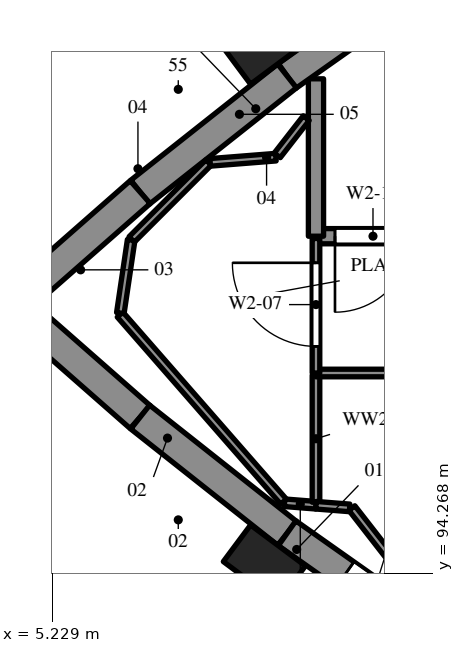
"""IFC4 building model, lengths in metres.
Left out: names, types, materials, properties, quantities, classifications, styles, units other than length and angle.
Written with IfcOpenShell. Run it as: python <this file> out.ifc"""

import sys

from ifc_helpers import new_model, si_unit, direction, frame, frame_2d, origin, origin_2d, place, context, subcontext, project, spatial, polyline, rectangle, outline, extrude, element, fill, save


model = new_model("IFC4")
c1 = context("Model", 3, precision=1e-05, world=origin(), true_north=direction((0.0, 1.0)))
c2 = subcontext(c1, "Body", "Model", "MODEL_VIEW")
j1 = project(units=[si_unit("LENGTHUNIT", "METRE"), si_unit("PLANEANGLEUNIT", "RADIAN")], contexts=[c1])
p1 = place(None, origin())
s1 = spatial("IfcSite", under=j1, at=p1, CompositionType="ELEMENT")
p2 = place(p1, origin())
s2 = spatial("IfcBuilding", under=s1, at=p2, CompositionType="ELEMENT")
p3 = place(p2, frame((0.0, 0.0, 10.2)))
s3 = spatial("IfcBuildingStorey", under=s2, at=p3, CompositionType="ELEMENT", Elevation=10.2)
p4 = place(p3, frame((16.9, 98.7, 0.0), z_axis=(0.0, 0.0, 1.0), x_axis=(-1.0, 0.0, 0.0)))
e1 = element("IfcWall", 1, at=p4, inside=s3, PredefinedType="SHEAR", context=c2, shape_type="SweptSolid", body=[
    extrude(outline(polyline([(0.0, 0.0), (8.2, 0.0), (8.2, 5.845), (8.187, 5.849), (8.088, 5.881), (7.972, 5.899), (7.896, 5.911), (7.819, 5.891), (0.0, 8.908), (0.0, 0.0)])), frame((0.0, 0.1, 0.0), z_axis=(0.0, -1.0, 0.0), x_axis=(1.0, 0.0, 0.0)), (0.0, 0.0, 1.0), 0.2),
])
p5 = place(p4, frame((6.95, 0.0, 0.0)))
e2 = element("IfcOpeningElement", 2, at=p5, cuts=e1, PredefinedType="OPENING", context=c2, shape_type="SweptSolid", body=[
    extrude(rectangle(XDim=1.0, YDim=2.4, at=frame_2d((0.5, 1.2))), frame((0.0, 0.11, 0.0), z_axis=(0.0, -1.0, 0.0), x_axis=(1.0, 0.0, 0.0)), (0.0, 0.0, 1.0), 0.22),
])
p6 = place(p3, frame((8.7, 98.7, 0.0), z_axis=(0.0, 0.0, 1.0), x_axis=(0.0, 1.0, 0.0)))
e3 = element("IfcWall", 3, at=p6, inside=s3, PredefinedType="SHEAR", context=c2, shape_type="SweptSolid", body=[
    extrude(outline(polyline([(0.0, 0.0), (2.071, 0.0), (2.071, 4.028), (0.077, 5.842), (0.0, 5.912), (0.0, 0.0)])), frame((0.0, 0.1, 0.0), z_axis=(0.0, -1.0, 0.0), x_axis=(1.0, 0.0, 0.0)), (0.0, 0.0, 1.0), 0.2),
])
p7 = place(p3, frame((4.703, 97.8, 0.0), z_axis=(0.0, 0.0, 1.0), x_axis=(0.751212351098, -0.660060605973, 0.0)))
e4 = element("IfcWall", 4, at=p7, inside=s3, PredefinedType="SOLIDWALL", context=c2, shape_type="SweptSolid", body=[
    extrude(outline(polyline([(0.0, 0.0), (2.242, 0.0), (2.242, 2.647), (2.202, 2.635), (0.372, 1.901), (0.145, 1.809), (0.083, 1.784), (0.0, 1.751), (0.0, 0.0)])), frame((0.0, 0.2, 0.0), z_axis=(0.0, -1.0, 0.0), x_axis=(1.0, 0.0, 0.0)), (0.0, 0.0, 1.0), 0.4),
])
p8 = place(p3, frame((6.387, 96.32, 0.0), z_axis=(0.0, 0.0, 1.0), x_axis=(0.784278812541, -0.620408530082, 0.0)))
e5 = element("IfcWall", 5, at=p8, inside=s3, PredefinedType="SOLIDWALL", context=c2, shape_type="SweptSolid", body=[
    extrude(outline(polyline([(0.0, 0.0), (2.464, 0.0), (2.464, 3.551), (2.446, 3.544), (2.288, 3.486), (2.129, 3.428), (0.051, 2.669), (0.0, 2.651), (0.0, 0.0)])), frame((0.0, 0.2, 0.0), z_axis=(0.0, -1.0, 0.0), x_axis=(1.0, 0.0, 0.0)), (0.0, 0.0, 1.0), 0.4),
])
p9 = place(p3, frame((8.32, 94.792, 0.0), z_axis=(0.0, 0.0, 1.0), x_axis=(0.817028877428, -0.576596751161, 0.0)))
e6 = element("IfcWall", 6, at=p9, inside=s3, PredefinedType="SOLIDWALL", context=c2, shape_type="SweptSolid", body=[
    extrude(outline(polyline([(0.0, 0.0), (2.772, 0.0), (2.772, 2.848), (2.406, 2.968), (0.311, 3.647), (0.169, 3.693), (0.0, 3.555), (0.0, 0.0)])), frame((0.0, 0.2, 0.0), z_axis=(0.0, -1.0, 0.0), x_axis=(1.0, 0.0, 0.0)), (0.0, 0.0, 1.0), 0.4),
])
p10 = place(p9, frame((0.936, 0.0, 1.6)))
e7 = element("IfcOpeningElement", 7, at=p10, cuts=e6, PredefinedType="OPENING", context=c2, shape_type="SweptSolid", body=[
    extrude(rectangle(XDim=0.9, YDim=0.6, at=frame_2d((0.45, 0.3))), frame((0.0, 0.21, 0.0), z_axis=(0.0, -1.0, 0.0), x_axis=(1.0, 0.0, 0.0)), (0.0, 0.0, 1.0), 0.42),
])
p11 = place(p3, frame((10.585, 102.407, 0.0), z_axis=(0.0, 0.0, 1.0), x_axis=(-0.817070367038, -0.57653795652, 0.0)))
e8 = element("IfcWall", 8, at=p11, inside=s3, PredefinedType="SOLIDWALL", context=c2, shape_type="SweptSolid", body=[
    extrude(outline(polyline([(0.0, 0.0), (2.772, 0.0), (2.772, 3.555), (2.744, 3.568), (2.603, 3.693), (2.462, 3.647), (0.367, 2.968), (0.0, 2.848), (0.0, 0.0)])), frame((0.0, 0.2, 0.0), z_axis=(0.0, -1.0, 0.0), x_axis=(1.0, 0.0, 0.0)), (0.0, 0.0, 1.0), 0.4),
])
p12 = place(p3, frame((8.32, 100.809, 0.0), z_axis=(0.0, 0.0, 1.0), x_axis=(-0.784278812541, -0.620408530082, 0.0)))
e9 = element("IfcWall", 9, at=p12, inside=s3, PredefinedType="SOLIDWALL", context=c2, shape_type="SweptSolid", body=[
    extrude(outline(polyline([(0.0, 0.0), (2.464, 0.0), (2.464, 2.651), (2.414, 2.669), (0.335, 3.428), (0.177, 3.486), (0.0, 3.551), (0.0, 0.0)])), frame((0.0, 0.2, 0.0), z_axis=(0.0, -1.0, 0.0), x_axis=(1.0, 0.0, 0.0)), (0.0, 0.0, 1.0), 0.4),
])
p13 = place(p3, frame((6.387, 99.28, 0.0), z_axis=(0.0, 0.0, 1.0), x_axis=(-0.751212351098, -0.660060605973, 0.0)))
e10 = element("IfcWall", 10, at=p13, inside=s3, PredefinedType="SOLIDWALL", context=c2, shape_type="SweptSolid", body=[
    extrude(outline(polyline([(0.0, 0.0), (2.242, 0.0), (2.242, 1.751), (2.159, 1.784), (2.097, 1.809), (1.869, 1.901), (0.0, 2.647), (0.0, 0.0)])), frame((0.0, 0.2, 0.0), z_axis=(0.0, -1.0, 0.0), x_axis=(1.0, 0.0, 0.0)), (0.0, 0.0, 1.0), 0.4),
])
for number, where, z_axis, x_axis in (
    (11, (8.021, 94.391, 0.0), (0.0, 0.0, 1.0), (0.802, -0.597, 0.0)),
    (12, (8.021, 101.209, 0.0), (0.0, 0.0, 1.0), (-0.802, -0.597, 0.0)),
):
    element("IfcColumn", number, at=place(p3, frame(where, z_axis=z_axis, x_axis=x_axis)), inside=s3, PredefinedType="PILASTER", context=c2, shape_type="SweptSolid", body=[
        extrude(rectangle(XDim=0.9, YDim=0.6, at=origin_2d()), origin(), (0.0, 0.0, 1.0), 2.507),
    ])
p14 = place(p3, frame((8.7, 95.16, 0.0), z_axis=(0.0, 0.0, 1.0), x_axis=(-0.996882323864, 0.078902676549, 0.0)))
e13 = element("IfcWall", 13, at=p14, inside=s3, PredefinedType="PARTITIONING", context=c2, shape_type="SweptSolid", body=[
    extrude(rectangle(XDim=0.415, YDim=0.1, at=frame_2d((0.207, 0.0))), origin(), (0.0, 0.0, 1.0), 2.5),
])
p15 = place(p3, frame((8.274, 95.208, 0.0), z_axis=(0.0, 0.0, 1.0), x_axis=(-0.658002077141, 0.753016113027, 0.0)))
e14 = element("IfcWall", 14, at=p15, inside=s3, PredefinedType="PARTITIONING", context=c2, shape_type="SweptSolid", body=[
    extrude(rectangle(XDim=3.268, YDim=0.1, at=frame_2d((1.634, 0.0))), origin(), (0.0, 0.0, 1.0), 2.5),
])
p16 = place(p3, frame((6.126, 97.689, 0.0), z_axis=(0.0, 0.0, 1.0), x_axis=(0.146448518259, 0.989218293148, 0.0)))
e15 = element("IfcWall", 15, at=p16, inside=s3, PredefinedType="PARTITIONING", context=c2, shape_type="SweptSolid", body=[
    extrude(rectangle(XDim=0.972, YDim=0.1, at=frame_2d((0.486, 0.0))), origin(), (0.0, 0.0, 1.0), 2.5),
])
p17 = place(p3, frame((6.275, 98.657, 0.0), z_axis=(0.0, 0.0, 1.0), x_axis=(0.707106781187, 0.707106781187, 0.0)))
e16 = element("IfcWall", 16, at=p17, inside=s3, PredefinedType="PARTITIONING", context=c2, shape_type="SweptSolid", body=[
    extrude(rectangle(XDim=1.432, YDim=0.1, at=frame_2d((0.716, 0.0))), origin(), (0.0, 0.0, 1.0), 2.5),
])
p18 = place(p3, frame((7.308, 99.671, 0.0), z_axis=(0.0, 0.0, 1.0), x_axis=(0.996862570919, 0.07915184584, 0.0)))
e17 = element("IfcWall", 17, at=p18, inside=s3, PredefinedType="PARTITIONING", context=c2, shape_type="SweptSolid", body=[
    extrude(rectangle(XDim=0.867, YDim=0.1, at=frame_2d((0.433, 0.0))), origin(), (0.0, 0.0, 1.0), 2.5),
])
p19 = place(p3, frame((8.191, 99.764, 0.0), z_axis=(0.0, 0.0, 1.0), x_axis=(0.61432197666, 0.789055453686, 0.0)))
e18 = element("IfcWall", 18, at=p19, inside=s3, PredefinedType="PARTITIONING", context=c2, shape_type="SweptSolid", body=[
    extrude(rectangle(XDim=0.62, YDim=0.1, at=frame_2d((0.31, 0.0))), origin(), (0.0, 0.0, 1.0), 2.5),
])
p20 = place(p3, frame((8.7, 95.2, 0.0), z_axis=(0.0, 0.0, 1.0), x_axis=(0.0, 1.0, 0.0)))
e19 = element("IfcWall", 19, at=p20, inside=s3, PredefinedType="PARTITIONING", context=c2, shape_type="SweptSolid", body=[
    extrude(rectangle(XDim=1.67, YDim=0.1, at=frame_2d((0.835, 0.0))), origin(), (0.0, 0.0, 1.0), 2.5),
])
p21 = place(p3, frame((10.255, 93.732, 0.0), z_axis=(0.0, 0.0, 1.0), x_axis=(-0.614371992728, 0.78901651095, 0.0)))
e20 = element("IfcWall", 20, at=p21, inside=s3, PredefinedType="PARTITIONING", context=c2, shape_type="SweptSolid", body=[
    extrude(rectangle(XDim=1.763, YDim=0.1, at=frame_2d((0.881, 0.0))), origin(), (0.0, 0.0, 1.0), 2.5),
])
p22 = place(p3, frame((9.142, 95.125, 0.0), z_axis=(0.0, 0.0, 1.0), x_axis=(-0.996900420086, 0.078673708649, 0.0)))
e21 = element("IfcWall", 21, at=p22, inside=s3, PredefinedType="PARTITIONING", context=c2, shape_type="SweptSolid", body=[
    extrude(rectangle(XDim=0.444, YDim=0.1, at=frame_2d((0.222, 0.0))), origin(), (0.0, 0.0, 1.0), 2.5),
])
p23 = place(p3, frame((11.433, 96.9, 0.0), z_axis=(0.0, 0.0, 1.0), x_axis=(-1.0, 0.0, 0.0)))
e22 = element("IfcWall", 22, at=p23, inside=s3, PredefinedType="PARTITIONING", context=c2, shape_type="SweptSolid", body=[
    extrude(rectangle(XDim=2.733, YDim=0.1, at=frame_2d((1.367, 0.0))), origin(), (0.0, 0.0, 1.0), 2.5),
])
p24 = place(p23, frame((0.917, 0.0, 0.0)))
e23 = element("IfcOpeningElement", 23, at=p24, cuts=e22, PredefinedType="OPENING", context=c2, shape_type="SweptSolid", body=[
    extrude(rectangle(XDim=0.9, YDim=2.1, at=frame_2d((0.45, 1.05))), frame((0.0, 0.06, 0.0), z_axis=(0.0, -1.0, 0.0), x_axis=(1.0, 0.0, 0.0)), (0.0, 0.0, 1.0), 0.12),
])
p25 = place(p3, frame((8.7, 96.9, 0.0), z_axis=(0.0, 0.0, 1.0), x_axis=(0.0, 1.0, 0.0)))
e24 = element("IfcWall", 24, at=p25, inside=s3, PredefinedType="PARTITIONING", context=c2, shape_type="SweptSolid", body=[
    extrude(rectangle(XDim=1.77, YDim=0.1, at=frame_2d((0.885, 0.0))), origin(), (0.0, 0.0, 1.0), 2.5),
])
p26 = place(p25, frame((0.35, 0.0, 0.0)))
e25 = element("IfcOpeningElement", 25, at=p26, cuts=e24, PredefinedType="OPENING", context=c2, shape_type="SweptSolid", body=[
    extrude(rectangle(XDim=1.1, YDim=2.1, at=frame_2d((0.55, 1.05))), frame((0.0, 0.06, 0.0), z_axis=(0.0, -1.0, 0.0), x_axis=(1.0, 0.0, 0.0)), (0.0, 0.0, 1.0), 0.12),
])
p27 = place(p10, origin())
e26 = element("IfcWindow", 26, at=p27, inside=s3, PartitioningType="SINGLE_PANEL", PredefinedType="WINDOW", context=c2, shape_type="SweptSolid", body=[
    extrude(rectangle(XDim=0.9, YDim=0.6, at=frame_2d((0.45, 0.3))), frame((0.0, 0.03, 0.0), z_axis=(0.0, -1.0, 0.0), x_axis=(1.0, 0.0, 0.0)), (0.0, 0.0, 1.0), 0.06),
])
fill(e7, e26)
p28 = place(p26, origin())
e27 = element("IfcDoor", 27, at=p28, inside=s3, OperationType="SINGLE_SWING_RIGHT", PredefinedType="DOOR", context=c2, shape_type="SweptSolid", body=[
    extrude(rectangle(XDim=1.1, YDim=2.1, at=frame_2d((0.55, 1.05))), frame((0.0, 0.025, 0.0), z_axis=(0.0, -1.0, 0.0), x_axis=(1.0, 0.0, 0.0)), (0.0, 0.0, 1.0), 0.05),
])
fill(e25, e27)
p29 = place(p5, origin())
e28 = element("IfcDoor", 28, at=p29, inside=s3, OperationType="SINGLE_SWING_RIGHT", PredefinedType="DOOR", context=c2, shape_type="SweptSolid", body=[
    extrude(rectangle(XDim=1.0, YDim=2.4, at=frame_2d((0.5, 1.2))), frame((0.0, 0.025, 0.0), z_axis=(0.0, -1.0, 0.0), x_axis=(1.0, 0.0, 0.0)), (0.0, 0.0, 1.0), 0.05),
])
fill(e2, e28)
save(model, sys.argv[1])
